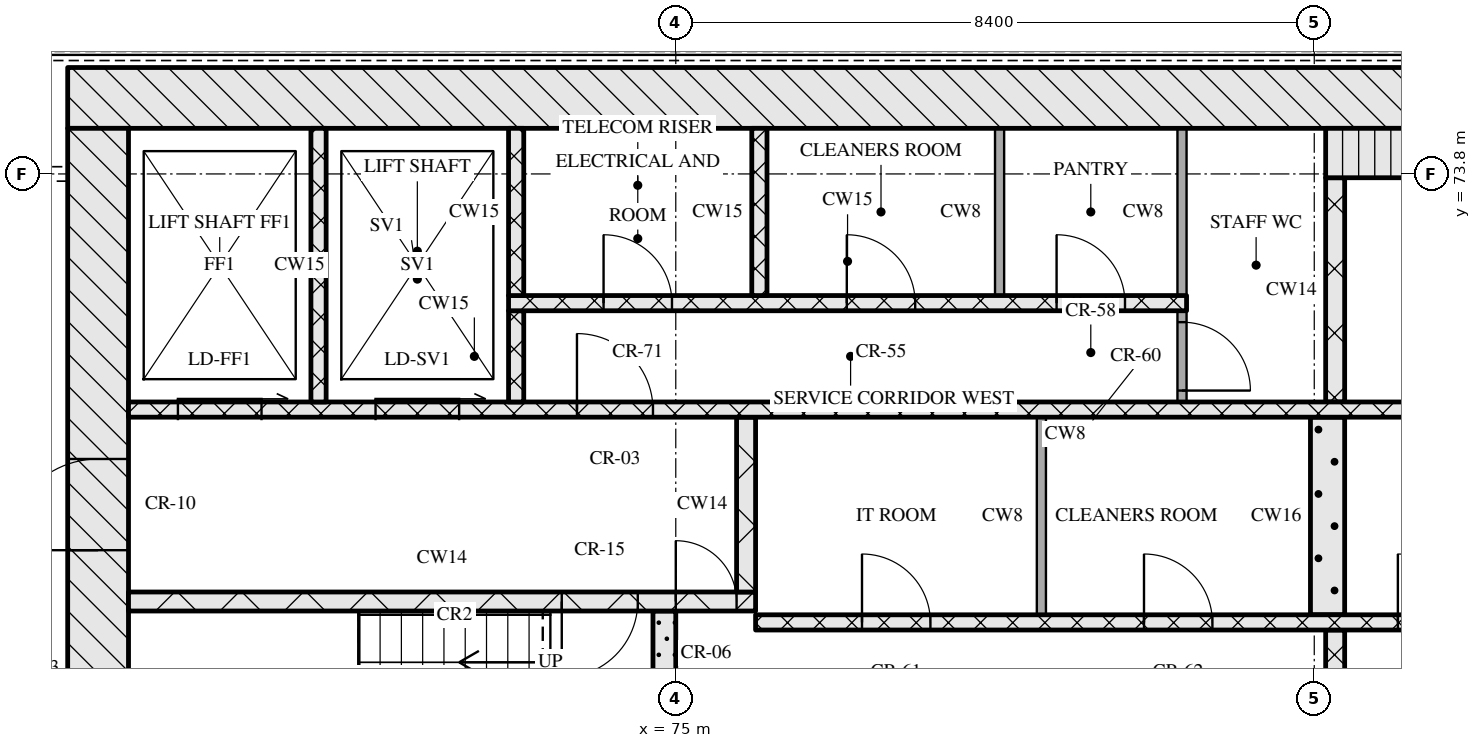
"""IFC4 building model, lengths in metres.
Left out: names, types, materials, properties, quantities, classifications, styles, units other than length and angle.
Written with IfcOpenShell. Run it as: python <this file> out.ifc"""

import sys

from ifc_helpers import new_model, si_unit, direction, frame, frame_2d, origin, place, context, subcontext, project, spatial, rectangle, extrude, element, fill, save


model = new_model("IFC4")
c1 = context("Model", 3, precision=1e-05, world=origin(), true_north=direction((0.0, 1.0)))
c2 = subcontext(c1, "Body", "Model", "MODEL_VIEW")
j1 = project(units=[si_unit("LENGTHUNIT", "METRE"), si_unit("PLANEANGLEUNIT", "RADIAN")], contexts=[c1])
p1 = place(None, origin())
s1 = spatial("IfcSite", under=j1, at=p1, CompositionType="ELEMENT")
p2 = place(p1, origin())
s2 = spatial("IfcBuilding", under=s1, at=p2, CompositionType="ELEMENT")
p3 = place(p2, frame((0.0, 0.0, 151.05)))
s3 = spatial("IfcBuildingStorey", under=s2, at=p3, CompositionType="ELEMENT", Elevation=151.05)
p4 = place(p3, frame((67.0, 74.8, 0.0), z_axis=(0.0, 0.0, 1.0), x_axis=(1.0, 0.0, 0.0)))
e1 = element("IfcWall", 1, at=p4, inside=s3, PredefinedType="SOLIDWALL", context=c2, shape_type="SweptSolid", body=[
    extrude(rectangle(XDim=41.2, YDim=0.8, at=frame_2d((20.6, 0.0))), origin(), (0.0, 0.0, 1.0), 3.32),
])
p5 = place(p3, frame((67.4, 62.4, 0.0), z_axis=(0.0, 0.0, 1.0), x_axis=(0.0, 1.0, 0.0)))
e2 = element("IfcWall", 2, at=p5, inside=s3, PredefinedType="SOLIDWALL", context=c2, shape_type="SweptSolid", body=[
    extrude(rectangle(XDim=12.0, YDim=0.8, at=frame_2d((6.0, 0.0))), origin(), (0.0, 0.0, 1.0), 3.32),
])
p6 = place(p5, frame((6.45, 0.0, 0.0)))
e3 = element("IfcOpeningElement", 3, at=p6, cuts=e2, PredefinedType="OPENING", context=c2, shape_type="SweptSolid", body=[
    extrude(rectangle(XDim=1.2, YDim=2.1, at=frame_2d((0.6, 1.05))), frame((0.0, 0.41, 0.0), z_axis=(0.0, -1.0, 0.0), x_axis=(1.0, 0.0, 0.0)), (0.0, 0.0, 1.0), 0.82),
])
p7 = place(p3, frame((74.85, 65.2, 0.0), z_axis=(0.0, 0.0, 1.0), x_axis=(0.0, 1.0, 0.0)))
e4 = element("IfcWall", 4, at=p7, inside=s3, PredefinedType="SOLIDWALL", context=c2, shape_type="SweptSolid", body=[
    extrude(rectangle(XDim=2.85, YDim=0.3, at=frame_2d((1.425, 0.0))), origin(), (0.0, 0.0, 1.0), 3.32),
])
p8 = place(p3, frame((83.675, 65.2, 0.0), z_axis=(0.0, 0.0, 1.0), x_axis=(0.0, 1.0, 0.0)))
e5 = element("IfcWall", 5, at=p8, inside=s3, PredefinedType="SOLIDWALL", context=c2, shape_type="SweptSolid", body=[
    extrude(rectangle(XDim=2.6, YDim=0.25, at=frame_2d((1.3, 0.0))), origin(), (0.0, 0.0, 1.0), 3.32),
])
p9 = place(p8, frame((0.7, 0.0, 0.0)))
e6 = element("IfcOpeningElement", 6, at=p9, cuts=e5, PredefinedType="OPENING", context=c2, shape_type="SweptSolid", body=[
    extrude(rectangle(XDim=1.2, YDim=2.1, at=frame_2d((0.6, 1.05))), frame((0.0, 0.135, 0.0), z_axis=(0.0, -1.0, 0.0), x_axis=(1.0, 0.0, 0.0)), (0.0, 0.0, 1.0), 0.27),
])
p10 = place(p3, frame((76.05, 67.9, 0.0), z_axis=(0.0, 0.0, 1.0), x_axis=(1.0, 0.0, 0.0)))
e7 = element("IfcWall", 7, at=p10, inside=s3, PredefinedType="SOLIDWALL", context=c2, shape_type="SweptSolid", body=[
    extrude(rectangle(XDim=23.1, YDim=0.2, at=frame_2d((11.55, 0.0))), origin(), (0.0, 0.0, 1.0), 3.32),
])
p11 = place(p10, frame((1.4, 0.0, 0.0)))
e8 = element("IfcOpeningElement", 8, at=p11, cuts=e7, PredefinedType="OPENING", context=c2, shape_type="SweptSolid", body=[
    extrude(rectangle(XDim=0.9, YDim=2.1, at=frame_2d((0.45, 1.05))), frame((0.0, 0.11, 0.0), z_axis=(0.0, -1.0, 0.0), x_axis=(1.0, 0.0, 0.0)), (0.0, 0.0, 1.0), 0.22),
])
p12 = place(p10, frame((5.11, 0.0, 0.0)))
e9 = element("IfcOpeningElement", 9, at=p12, cuts=e7, PredefinedType="OPENING", context=c2, shape_type="SweptSolid", body=[
    extrude(rectangle(XDim=0.9, YDim=2.1, at=frame_2d((0.45, 1.05))), frame((0.0, 0.11, 0.0), z_axis=(0.0, -1.0, 0.0), x_axis=(1.0, 0.0, 0.0)), (0.0, 0.0, 1.0), 0.22),
])
p13 = place(p10, frame((8.45, 0.0, 0.0)))
e10 = element("IfcOpeningElement", 10, at=p13, cuts=e7, PredefinedType="OPENING", context=c2, shape_type="SweptSolid", body=[
    extrude(rectangle(XDim=0.9, YDim=2.1, at=frame_2d((0.45, 1.05))), frame((0.0, 0.11, 0.0), z_axis=(0.0, -1.0, 0.0), x_axis=(1.0, 0.0, 0.0)), (0.0, 0.0, 1.0), 0.22),
])
p14 = place(p10, frame((10.91, 0.0, 0.0)))
e11 = element("IfcOpeningElement", 11, at=p14, cuts=e7, PredefinedType="OPENING", context=c2, shape_type="SweptSolid", body=[
    extrude(rectangle(XDim=0.9, YDim=2.1, at=frame_2d((0.45, 1.05))), frame((0.0, 0.11, 0.0), z_axis=(0.0, -1.0, 0.0), x_axis=(1.0, 0.0, 0.0)), (0.0, 0.0, 1.0), 0.22),
])
p15 = place(p10, frame((13.55, 0.0, 0.0)))
e12 = element("IfcOpeningElement", 12, at=p15, cuts=e7, PredefinedType="OPENING", context=c2, shape_type="SweptSolid", body=[
    extrude(rectangle(XDim=1.0, YDim=2.1, at=frame_2d((0.5, 1.05))), frame((0.0, 0.11, 0.0), z_axis=(0.0, -1.0, 0.0), x_axis=(1.0, 0.0, 0.0)), (0.0, 0.0, 1.0), 0.22),
])
p16 = place(p10, frame((16.2, 0.0, 0.0)))
e13 = element("IfcOpeningElement", 13, at=p16, cuts=e7, PredefinedType="OPENING", context=c2, shape_type="SweptSolid", body=[
    extrude(rectangle(XDim=1.1, YDim=2.1, at=frame_2d((0.55, 1.05))), frame((0.0, 0.11, 0.0), z_axis=(0.0, -1.0, 0.0), x_axis=(1.0, 0.0, 0.0)), (0.0, 0.0, 1.0), 0.22),
])
p17 = place(p10, frame((18.7, 0.0, 0.0)))
e14 = element("IfcOpeningElement", 14, at=p17, cuts=e7, PredefinedType="OPENING", context=c2, shape_type="SweptSolid", body=[
    extrude(rectangle(XDim=1.1, YDim=2.1, at=frame_2d((0.55, 1.05))), frame((0.0, 0.11, 0.0), z_axis=(0.0, -1.0, 0.0), x_axis=(1.0, 0.0, 0.0)), (0.0, 0.0, 1.0), 0.22),
])
p18 = place(p10, frame((21.2, 0.0, 0.0)))
e15 = element("IfcOpeningElement", 15, at=p18, cuts=e7, PredefinedType="OPENING", context=c2, shape_type="SweptSolid", body=[
    extrude(rectangle(XDim=1.1, YDim=2.1, at=frame_2d((0.55, 1.05))), frame((0.0, 0.11, 0.0), z_axis=(0.0, -1.0, 0.0), x_axis=(1.0, 0.0, 0.0)), (0.0, 0.0, 1.0), 0.22),
])
p19 = place(p3, frame((79.81, 68.0, 0.0), z_axis=(0.0, 0.0, 1.0), x_axis=(0.0, 1.0, 0.0)))
e16 = element("IfcWall", 16, at=p19, inside=s3, PredefinedType="PARTITIONING", context=c2, shape_type="SweptSolid", body=[
    extrude(rectangle(XDim=2.6, YDim=0.12, at=frame_2d((1.3, 0.0))), origin(), (0.0, 0.0, 1.0), 3.32),
])
p20 = place(p3, frame((83.575, 68.0, 0.0), z_axis=(0.0, 0.0, 1.0), x_axis=(0.0, 1.0, 0.0)))
e17 = element("IfcWall", 17, at=p20, inside=s3, PredefinedType="SOLIDWALL", context=c2, shape_type="SweptSolid", body=[
    extrude(rectangle(XDim=2.6, YDim=0.45, at=frame_2d((1.3, 0.0))), origin(), (0.0, 0.0, 1.0), 3.32),
])
p21 = place(p3, frame((67.8, 68.175, 0.0), z_axis=(0.0, 0.0, 1.0), x_axis=(1.0, 0.0, 0.0)))
e18 = element("IfcWall", 18, at=p21, inside=s3, PredefinedType="SOLIDWALL", context=c2, shape_type="SweptSolid", body=[
    extrude(rectangle(XDim=8.25, YDim=0.25, at=frame_2d((4.125, 0.0))), origin(), (0.0, 0.0, 1.0), 3.32),
])
p22 = place(p21, frame((5.7, 0.0, 0.0)))
e19 = element("IfcOpeningElement", 19, at=p22, cuts=e18, PredefinedType="OPENING", context=c2, shape_type="SweptSolid", body=[
    extrude(rectangle(XDim=1.0, YDim=2.1, at=frame_2d((0.5, 1.05))), frame((0.0, 0.135, 0.0), z_axis=(0.0, -1.0, 0.0), x_axis=(1.0, 0.0, 0.0)), (0.0, 0.0, 1.0), 0.27),
])
p23 = place(p21, frame((7.2, 0.0, 0.0)))
e20 = element("IfcOpeningElement", 20, at=p23, cuts=e18, PredefinedType="OPENING", context=c2, shape_type="SweptSolid", body=[
    extrude(rectangle(XDim=0.8, YDim=2.1, at=frame_2d((0.4, 1.05))), frame((0.0, 0.135, 0.0), z_axis=(0.0, -1.0, 0.0), x_axis=(1.0, 0.0, 0.0)), (0.0, 0.0, 1.0), 0.27),
])
p24 = place(p3, frame((75.925, 68.3, 0.0), z_axis=(0.0, 0.0, 1.0), x_axis=(0.0, 1.0, 0.0)))
e21 = element("IfcWall", 21, at=p24, inside=s3, PredefinedType="SOLIDWALL", context=c2, shape_type="SweptSolid", body=[
    extrude(rectangle(XDim=2.3, YDim=0.25, at=frame_2d((1.15, 0.0))), origin(), (0.0, 0.0, 1.0), 3.32),
])
p25 = place(p3, frame((67.8, 70.7, 0.0), z_axis=(0.0, 0.0, 1.0), x_axis=(1.0, 0.0, 0.0)))
e22 = element("IfcWall", 22, at=p25, inside=s3, PredefinedType="SOLIDWALL", context=c2, shape_type="SweptSolid", body=[
    extrude(rectangle(XDim=39.6, YDim=0.2, at=frame_2d((19.8, 0.0))), origin(), (0.0, 0.0, 1.0), 3.32),
])
p26 = place(p25, frame((0.65, 0.0, 0.0)))
e23 = element("IfcOpeningElement", 23, at=p26, cuts=e22, PredefinedType="OPENING", context=c2, shape_type="SweptSolid", body=[
    extrude(rectangle(XDim=1.1, YDim=2.1, at=frame_2d((0.55, 1.05))), frame((0.0, 0.11, 0.0), z_axis=(0.0, -1.0, 0.0), x_axis=(1.0, 0.0, 0.0)), (0.0, 0.0, 1.0), 0.22),
])
p27 = place(p25, frame((3.25, 0.0, 0.0)))
e24 = element("IfcOpeningElement", 24, at=p27, cuts=e22, PredefinedType="OPENING", context=c2, shape_type="SweptSolid", body=[
    extrude(rectangle(XDim=1.1, YDim=2.1, at=frame_2d((0.55, 1.05))), frame((0.0, 0.11, 0.0), z_axis=(0.0, -1.0, 0.0), x_axis=(1.0, 0.0, 0.0)), (0.0, 0.0, 1.0), 0.22),
])
p28 = place(p25, frame((5.9, 0.0, 0.0)))
e25 = element("IfcOpeningElement", 25, at=p28, cuts=e22, PredefinedType="OPENING", context=c2, shape_type="SweptSolid", body=[
    extrude(rectangle(XDim=1.0, YDim=2.1, at=frame_2d((0.5, 1.05))), frame((0.0, 0.11, 0.0), z_axis=(0.0, -1.0, 0.0), x_axis=(1.0, 0.0, 0.0)), (0.0, 0.0, 1.0), 0.22),
])
p29 = place(p25, frame((21.7, 0.0, 0.0)))
e26 = element("IfcOpeningElement", 26, at=p29, cuts=e22, PredefinedType="OPENING", context=c2, shape_type="SweptSolid", body=[
    extrude(rectangle(XDim=1.0, YDim=2.1, at=frame_2d((0.5, 1.05))), frame((0.0, 0.11, 0.0), z_axis=(0.0, -1.0, 0.0), x_axis=(1.0, 0.0, 0.0)), (0.0, 0.0, 1.0), 0.22),
])
p30 = place(p25, frame((32.7, 0.0, 0.0)))
e27 = element("IfcOpeningElement", 27, at=p30, cuts=e22, PredefinedType="OPENING", context=c2, shape_type="SweptSolid", body=[
    extrude(rectangle(XDim=1.0, YDim=2.1, at=frame_2d((0.5, 1.05))), frame((0.0, 0.11, 0.0), z_axis=(0.0, -1.0, 0.0), x_axis=(1.0, 0.0, 0.0)), (0.0, 0.0, 1.0), 0.22),
])
p31 = place(p25, frame((35.25, 0.0, 0.0)))
e28 = element("IfcOpeningElement", 28, at=p31, cuts=e22, PredefinedType="OPENING", context=c2, shape_type="SweptSolid", body=[
    extrude(rectangle(XDim=1.1, YDim=2.1, at=frame_2d((0.55, 1.05))), frame((0.0, 0.11, 0.0), z_axis=(0.0, -1.0, 0.0), x_axis=(1.0, 0.0, 0.0)), (0.0, 0.0, 1.0), 0.22),
])
p32 = place(p25, frame((37.85, 0.0, 0.0)))
e29 = element("IfcOpeningElement", 29, at=p32, cuts=e22, PredefinedType="OPENING", context=c2, shape_type="SweptSolid", body=[
    extrude(rectangle(XDim=1.1, YDim=2.1, at=frame_2d((0.55, 1.05))), frame((0.0, 0.11, 0.0), z_axis=(0.0, -1.0, 0.0), x_axis=(1.0, 0.0, 0.0)), (0.0, 0.0, 1.0), 0.22),
])
p33 = place(p3, frame((70.3, 70.8, 0.0), z_axis=(0.0, 0.0, 1.0), x_axis=(0.0, 1.0, 0.0)))
e30 = element("IfcWall", 30, at=p33, inside=s3, PredefinedType="SOLIDWALL", context=c2, shape_type="SweptSolid", body=[
    extrude(rectangle(XDim=3.6, YDim=0.2, at=frame_2d((1.8, 0.0))), origin(), (0.0, 0.0, 1.0), 3.32),
])
p34 = place(p3, frame((72.9, 70.8, 0.0), z_axis=(0.0, 0.0, 1.0), x_axis=(0.0, 1.0, 0.0)))
e31 = element("IfcWall", 31, at=p34, inside=s3, PredefinedType="SOLIDWALL", context=c2, shape_type="SweptSolid", body=[
    extrude(rectangle(XDim=1.2, YDim=0.2, at=frame_2d((0.6, 0.0))), origin(), (0.0, 0.0, 1.0), 3.32),
])
p35 = place(p3, frame((81.66, 70.8, 0.0), z_axis=(0.0, 0.0, 1.0), x_axis=(0.0, 1.0, 0.0)))
e32 = element("IfcWall", 32, at=p35, inside=s3, PredefinedType="PARTITIONING", context=c2, shape_type="SweptSolid", body=[
    extrude(rectangle(XDim=1.2, YDim=0.12, at=frame_2d((0.6, 0.0))), origin(), (0.0, 0.0, 1.0), 3.32),
])
p36 = place(p35, frame((0.15, 0.0, 0.0)))
e33 = element("IfcOpeningElement", 33, at=p36, cuts=e32, PredefinedType="OPENING", context=c2, shape_type="SweptSolid", body=[
    extrude(rectangle(XDim=0.9, YDim=2.1, at=frame_2d((0.45, 1.05))), frame((0.0, 0.07, 0.0), z_axis=(0.0, -1.0, 0.0), x_axis=(1.0, 0.0, 0.0)), (0.0, 0.0, 1.0), 0.14),
])
p37 = place(p3, frame((83.675, 70.8, 0.0), z_axis=(0.0, 0.0, 1.0), x_axis=(0.0, 1.0, 0.0)))
e34 = element("IfcWall", 34, at=p37, inside=s3, PredefinedType="SOLIDWALL", context=c2, shape_type="SweptSolid", body=[
    extrude(rectangle(XDim=2.95, YDim=0.25, at=frame_2d((1.475, 0.0))), origin(), (0.0, 0.0, 1.0), 3.32),
])
p38 = place(p3, frame((72.8, 72.1, 0.0), z_axis=(0.0, 0.0, 1.0), x_axis=(1.0, 0.0, 0.0)))
e35 = element("IfcWall", 35, at=p38, inside=s3, PredefinedType="SOLIDWALL", context=c2, shape_type="SweptSolid", body=[
    extrude(rectangle(XDim=8.92, YDim=0.2, at=frame_2d((4.46, 0.0))), origin(), (0.0, 0.0, 1.0), 3.32),
])
p39 = place(p38, frame((1.25, 0.0, 0.0)))
e36 = element("IfcOpeningElement", 36, at=p39, cuts=e35, PredefinedType="OPENING", context=c2, shape_type="SweptSolid", body=[
    extrude(rectangle(XDim=0.9, YDim=2.1, at=frame_2d((0.45, 1.05))), frame((0.0, 0.11, 0.0), z_axis=(0.0, -1.0, 0.0), x_axis=(1.0, 0.0, 0.0)), (0.0, 0.0, 1.0), 0.22),
])
p40 = place(p38, frame((4.45, 0.0, 0.0)))
e37 = element("IfcOpeningElement", 37, at=p40, cuts=e35, PredefinedType="OPENING", context=c2, shape_type="SweptSolid", body=[
    extrude(rectangle(XDim=0.9, YDim=2.1, at=frame_2d((0.45, 1.05))), frame((0.0, 0.11, 0.0), z_axis=(0.0, -1.0, 0.0), x_axis=(1.0, 0.0, 0.0)), (0.0, 0.0, 1.0), 0.22),
])
p41 = place(p38, frame((7.21, 0.0, 0.0)))
e38 = element("IfcOpeningElement", 38, at=p41, cuts=e35, PredefinedType="OPENING", context=c2, shape_type="SweptSolid", body=[
    extrude(rectangle(XDim=0.9, YDim=2.1, at=frame_2d((0.45, 1.05))), frame((0.0, 0.11, 0.0), z_axis=(0.0, -1.0, 0.0), x_axis=(1.0, 0.0, 0.0)), (0.0, 0.0, 1.0), 0.22),
])
for number, where, z_axis, x_axis in (
    (39, (72.9, 72.2, 0.0), (0.0, 0.0, 1.0), (0.0, 1.0, 0.0)),
    (40, (76.1, 72.2, 0.0), (0.0, 0.0, 1.0), (0.0, 1.0, 0.0)),
):
    element("IfcWall", number, at=place(p3, frame(where, z_axis=z_axis, x_axis=x_axis)), inside=s3, PredefinedType="SOLIDWALL", context=c2, shape_type="SweptSolid", body=[
        extrude(rectangle(XDim=2.2, YDim=0.2, at=frame_2d((1.1, 0.0))), origin(), (0.0, 0.0, 1.0), 3.32),
    ])
for number, where, z_axis, x_axis in (
    (41, (79.26, 72.2, 0.0), (0.0, 0.0, 1.0), (0.0, 1.0, 0.0)),
    (42, (81.66, 72.2, 0.0), (0.0, 0.0, 1.0), (0.0, 1.0, 0.0)),
):
    element("IfcWall", number, at=place(p3, frame(where, z_axis=z_axis, x_axis=x_axis)), inside=s3, PredefinedType="PARTITIONING", context=c2, shape_type="SweptSolid", body=[
        extrude(rectangle(XDim=2.2, YDim=0.12, at=frame_2d((1.1, 0.0))), origin(), (0.0, 0.0, 1.0), 3.32),
    ])
p42 = place(p3, frame((83.55, 74.075, 0.0), z_axis=(0.0, 0.0, 1.0), x_axis=(1.0, 0.0, 0.0)))
e43 = element("IfcWall", 43, at=p42, inside=s3, PredefinedType="SOLIDWALL", context=c2, shape_type="SweptSolid", body=[
    extrude(rectangle(XDim=8.1, YDim=0.65, at=frame_2d((4.05, 0.0))), origin(), (0.0, 0.0, 1.0), 3.32),
])
p43 = place(p11, origin())
e44 = element("IfcDoor", 44, at=p43, inside=s3, OperationType="SINGLE_SWING_LEFT", PredefinedType="DOOR", context=c2, shape_type="SweptSolid", body=[
    extrude(rectangle(XDim=0.9, YDim=2.1, at=frame_2d((0.45, 1.05))), frame((0.0, 0.025, 0.0), z_axis=(0.0, -1.0, 0.0), x_axis=(1.0, 0.0, 0.0)), (0.0, 0.0, 1.0), 0.05),
])
fill(e8, e44)
p44 = place(p12, origin())
e45 = element("IfcDoor", 45, at=p44, inside=s3, OperationType="SINGLE_SWING_LEFT", PredefinedType="DOOR", context=c2, shape_type="SweptSolid", body=[
    extrude(rectangle(XDim=0.9, YDim=2.1, at=frame_2d((0.45, 1.05))), frame((0.0, 0.025, 0.0), z_axis=(0.0, -1.0, 0.0), x_axis=(1.0, 0.0, 0.0)), (0.0, 0.0, 1.0), 0.05),
])
fill(e9, e45)
p45 = place(p13, origin())
e46 = element("IfcDoor", 46, at=p45, inside=s3, OperationType="SINGLE_SWING_LEFT", PredefinedType="DOOR", context=c2, shape_type="SweptSolid", body=[
    extrude(rectangle(XDim=0.9, YDim=2.1, at=frame_2d((0.45, 1.05))), frame((0.0, 0.025, 0.0), z_axis=(0.0, -1.0, 0.0), x_axis=(1.0, 0.0, 0.0)), (0.0, 0.0, 1.0), 0.05),
])
fill(e10, e46)
p46 = place(p22, origin())
e47 = element("IfcDoor", 47, at=p46, inside=s3, OperationType="SINGLE_SWING_RIGHT", PredefinedType="DOOR", context=c2, shape_type="SweptSolid", body=[
    extrude(rectangle(XDim=1.0, YDim=2.1, at=frame_2d((0.5, 1.05))), frame((0.0, 0.025, 0.0), z_axis=(0.0, -1.0, 0.0), x_axis=(1.0, 0.0, 0.0)), (0.0, 0.0, 1.0), 0.05),
])
fill(e19, e47)
p47 = place(p23, origin())
e48 = element("IfcDoor", 48, at=p47, inside=s3, OperationType="SINGLE_SWING_LEFT", PredefinedType="DOOR", context=c2, shape_type="SweptSolid", body=[
    extrude(rectangle(XDim=0.8, YDim=2.1, at=frame_2d((0.4, 1.05))), frame((0.0, 0.025, 0.0), z_axis=(0.0, -1.0, 0.0), x_axis=(1.0, 0.0, 0.0)), (0.0, 0.0, 1.0), 0.05),
])
fill(e20, e48)
p48 = place(p6, origin())
e49 = element("IfcDoor", 49, at=p48, inside=s3, OperationType="SINGLE_SWING_LEFT", PredefinedType="DOOR", context=c2, shape_type="SweptSolid", body=[
    extrude(rectangle(XDim=1.2, YDim=2.1, at=frame_2d((0.6, 1.05))), frame((0.0, 0.025, 0.0), z_axis=(0.0, -1.0, 0.0), x_axis=(1.0, 0.0, 0.0)), (0.0, 0.0, 1.0), 0.05),
])
fill(e3, e49)
p49 = place(p26, origin())
e50 = element("IfcDoor", 50, at=p49, inside=s3, OperationType="SLIDING_TO_RIGHT", PredefinedType="DOOR", context=c2, shape_type="SweptSolid", body=[
    extrude(rectangle(XDim=1.1, YDim=2.1, at=frame_2d((0.55, 1.05))), frame((0.0, 0.025, 0.0), z_axis=(0.0, -1.0, 0.0), x_axis=(1.0, 0.0, 0.0)), (0.0, 0.0, 1.0), 0.05),
])
fill(e23, e50)
p50 = place(p27, origin())
e51 = element("IfcDoor", 51, at=p50, inside=s3, OperationType="SLIDING_TO_RIGHT", PredefinedType="DOOR", context=c2, shape_type="SweptSolid", body=[
    extrude(rectangle(XDim=1.1, YDim=2.1, at=frame_2d((0.55, 1.05))), frame((0.0, 0.025, 0.0), z_axis=(0.0, -1.0, 0.0), x_axis=(1.0, 0.0, 0.0)), (0.0, 0.0, 1.0), 0.05),
])
fill(e24, e51)
p51 = place(p28, origin())
e52 = element("IfcDoor", 52, at=p51, inside=s3, OperationType="SINGLE_SWING_LEFT", PredefinedType="DOOR", context=c2, shape_type="SweptSolid", body=[
    extrude(rectangle(XDim=1.0, YDim=2.1, at=frame_2d((0.5, 1.05))), frame((0.0, 0.025, 0.0), z_axis=(0.0, -1.0, 0.0), x_axis=(1.0, 0.0, 0.0)), (0.0, 0.0, 1.0), 0.05),
])
fill(e25, e52)
p52 = place(p36, origin())
e53 = element("IfcDoor", 53, at=p52, inside=s3, OperationType="SINGLE_SWING_RIGHT", PredefinedType="DOOR", context=c2, shape_type="SweptSolid", body=[
    extrude(rectangle(XDim=0.9, YDim=2.1, at=frame_2d((0.45, 1.05))), frame((0.0, 0.025, 0.0), z_axis=(0.0, -1.0, 0.0), x_axis=(1.0, 0.0, 0.0)), (0.0, 0.0, 1.0), 0.05),
])
fill(e33, e53)
p53 = place(p39, origin())
e54 = element("IfcDoor", 54, at=p53, inside=s3, OperationType="SINGLE_SWING_LEFT", PredefinedType="DOOR", context=c2, shape_type="SweptSolid", body=[
    extrude(rectangle(XDim=0.9, YDim=2.1, at=frame_2d((0.45, 1.05))), frame((0.0, 0.025, 0.0), z_axis=(0.0, -1.0, 0.0), x_axis=(1.0, 0.0, 0.0)), (0.0, 0.0, 1.0), 0.05),
])
fill(e36, e54)
p54 = place(p40, origin())
e55 = element("IfcDoor", 55, at=p54, inside=s3, OperationType="SINGLE_SWING_LEFT", PredefinedType="DOOR", context=c2, shape_type="SweptSolid", body=[
    extrude(rectangle(XDim=0.9, YDim=2.1, at=frame_2d((0.45, 1.05))), frame((0.0, 0.025, 0.0), z_axis=(0.0, -1.0, 0.0), x_axis=(1.0, 0.0, 0.0)), (0.0, 0.0, 1.0), 0.05),
])
fill(e37, e55)
p55 = place(p41, origin())
e56 = element("IfcDoor", 56, at=p55, inside=s3, OperationType="SINGLE_SWING_LEFT", PredefinedType="DOOR", context=c2, shape_type="SweptSolid", body=[
    extrude(rectangle(XDim=0.9, YDim=2.1, at=frame_2d((0.45, 1.05))), frame((0.0, 0.025, 0.0), z_axis=(0.0, -1.0, 0.0), x_axis=(1.0, 0.0, 0.0)), (0.0, 0.0, 1.0), 0.05),
])
fill(e38, e56)
save(model, sys.argv[1])
